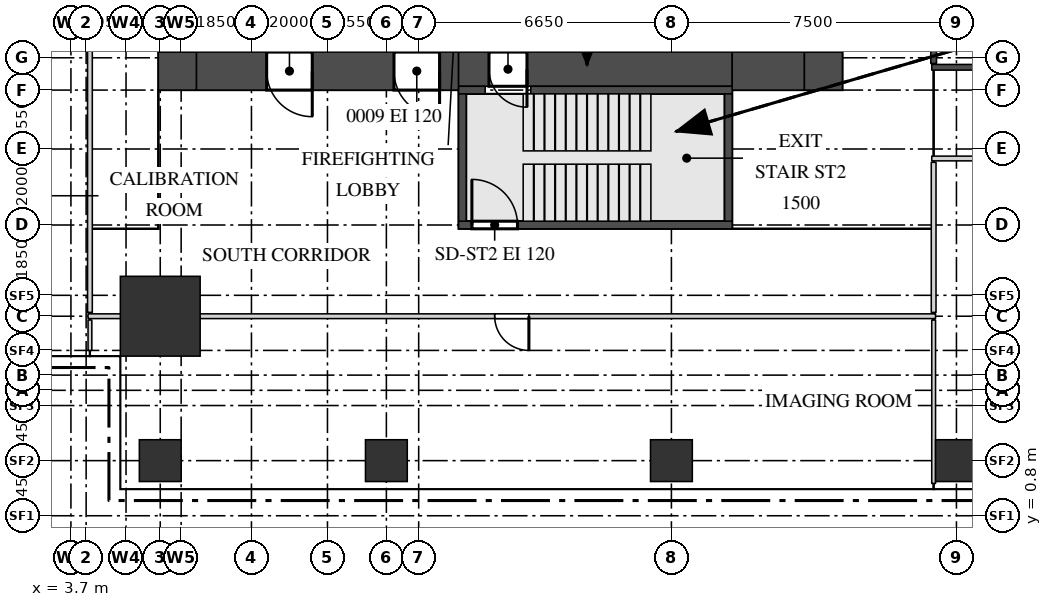
"""IFC4 building model, lengths in metres.
Left out: names, types, materials, properties, quantities, classifications, styles, units other than length and angle.
Written with IfcOpenShell. Run it as: python <this file> out.ifc"""

import sys

from ifc_helpers import new_model, si_unit, direction, frame, frame_2d, origin, origin_2d, place, context, subcontext, project, spatial, rectangle, extrude, source, transform, mapped, element, fill, save


model = new_model("IFC4")
c1 = context("Model", 3, precision=1e-05, world=origin(), true_north=direction((0.0, 1.0)))
c2 = subcontext(c1, "Body", "Model", "MODEL_VIEW")
j1 = project(units=[si_unit("LENGTHUNIT", "METRE"), si_unit("PLANEANGLEUNIT", "RADIAN")], contexts=[c1])
p1 = place(None, origin())
s1 = spatial("IfcSite", under=j1, at=p1, CompositionType="ELEMENT")
p2 = place(p1, origin())
s2 = spatial("IfcBuilding", under=s1, at=p2, CompositionType="ELEMENT")
p3 = place(p2, frame((0.0, 0.0, 127.9)))
s3 = spatial("IfcBuildingStorey", under=s2, at=p3, CompositionType="ELEMENT", Elevation=127.9)
m1 = source(origin(), c2, "Body", "SweptSolid", [
    extrude(rectangle(XDim=6.9, YDim=1.0, at=frame_2d((3.45, 0.0))), origin(), (0.0, 0.0, 1.0), 4.1),
])
p4 = place(p3, frame((7.0, 12.5, 0.0), z_axis=(0.0, 0.0, 1.0), x_axis=(1.0, 0.0, 0.0)))
e1 = element("IfcWall", 1, at=p4, inside=s3, PredefinedType="SHEAR", context=c2, shape_type="MappedRepresentation", body=[
    mapped(m1, transform((0.0, 0.0, 0.0))),
])
m2 = source(origin(), c2, "Body", "SweptSolid", [
    extrude(rectangle(XDim=1.2, YDim=2.1, at=frame_2d((0.6, 1.05))), frame((0.0, 0.51, 0.0), z_axis=(0.0, -1.0, 0.0), x_axis=(1.0, 0.0, 0.0)), (0.0, 0.0, 1.0), 1.02),
])
p5 = place(p4, frame((5.2, 0.0, 0.0)))
e2 = element("IfcOpeningElement", 2, at=p5, cuts=e1, PredefinedType="OPENING", context=c2, shape_type="MappedRepresentation", body=[
    mapped(m2, transform((0.0, 0.0, 0.0))),
])
p6 = place(p4, frame((1.85, 0.0, 0.0)))
e3 = element("IfcOpeningElement", 3, at=p6, cuts=e1, PredefinedType="OPENING", context=c2, shape_type="MappedRepresentation", body=[
    mapped(m2, transform((0.0, 0.0, 0.0))),
])
m3 = source(origin(), c2, "Body", "SweptSolid", [
    extrude(rectangle(XDim=7.2, YDim=0.9, at=frame_2d((3.6, 0.0))), origin(), (0.0, 0.0, 1.0), 4.1),
])
p7 = place(p3, frame((13.9, 12.55, 0.0), z_axis=(0.0, 0.0, 1.0), x_axis=(1.0, 0.0, 0.0)))
e4 = element("IfcWall", 4, at=p7, inside=s3, PredefinedType="SHEAR", context=c2, shape_type="MappedRepresentation", body=[
    mapped(m3, transform((0.0, 0.0, 0.0))),
])
m4 = source(origin(), c2, "Body", "SweptSolid", [
    extrude(rectangle(XDim=1.0, YDim=2.1, at=frame_2d((0.5, 1.05))), frame((0.0, 0.46, 0.0), z_axis=(0.0, -1.0, 0.0), x_axis=(1.0, 0.0, 0.0)), (0.0, 0.0, 1.0), 0.92),
])
p8 = place(p7, frame((0.8, 0.0, 0.0)))
e5 = element("IfcOpeningElement", 5, at=p8, cuts=e4, PredefinedType="OPENING", context=c2, shape_type="MappedRepresentation", body=[
    mapped(m4, transform((0.0, 0.0, 0.0))),
])
m5 = source(origin(), c2, "Body", "SweptSolid", [
    extrude(rectangle(XDim=1.9, YDim=1.0, at=frame_2d((0.95, 0.0))), origin(), (0.0, 0.0, 1.0), 4.1),
])
p9 = place(p3, frame((21.1, 12.5, 0.0), z_axis=(0.0, 0.0, 1.0), x_axis=(1.0, 0.0, 0.0)))
e6 = element("IfcWall", 6, at=p9, inside=s3, PredefinedType="SHEAR", context=c2, shape_type="MappedRepresentation", body=[
    mapped(m5, transform((0.0, 0.0, 0.0))),
])
m6 = source(origin(), c2, "Body", "SweptSolid", [
    extrude(rectangle(XDim=1.0, YDim=1.0, at=frame_2d((0.5, 0.0))), origin(), (0.0, 0.0, 1.0), 4.1),
])
for number, where, z_axis, x_axis in (
    (7, (23.0, 12.5, 0.0), (0.0, 0.0, 1.0), (1.0, 0.0, 0.0)),
    (8, (6.0, 12.5, 0.0), (0.0, 0.0, 1.0), (1.0, 0.0, 0.0)),
):
    element("IfcWall", number, at=place(p3, frame(where, z_axis=z_axis, x_axis=x_axis)), inside=s3, PredefinedType="SHEAR", context=c2, shape_type="MappedRepresentation", body=[
        mapped(m6, transform((0.0, 0.0, 0.0))),
    ])
m7 = source(origin(), c2, "Body", "SweptSolid", [
    extrude(rectangle(XDim=0.7, YDim=0.2, at=frame_2d((0.35, 0.0))), origin(), (0.0, 0.0, 1.0), 4.1),
])
p10 = place(p3, frame((13.9, 12.0, 0.0), z_axis=(0.0, 0.0, 1.0), x_axis=(1.0, 0.0, 0.0)))
e9 = element("IfcWall", 9, at=p10, inside=s3, PredefinedType="SHEAR", context=c2, shape_type="MappedRepresentation", body=[
    mapped(m7, transform((0.0, 0.0, 0.0))),
])
m8 = source(origin(), c2, "Body", "SweptSolid", [
    extrude(rectangle(XDim=5.3, YDim=0.2, at=frame_2d((2.65, 0.0))), origin(), (0.0, 0.0, 1.0), 4.1),
])
p11 = place(p3, frame((15.8, 12.0, 0.0), z_axis=(0.0, 0.0, 1.0), x_axis=(1.0, 0.0, 0.0)))
e10 = element("IfcWall", 10, at=p11, inside=s3, PredefinedType="SHEAR", context=c2, shape_type="MappedRepresentation", body=[
    mapped(m8, transform((0.0, 0.0, 0.0))),
])
m9 = source(origin(), c2, "Body", "SweptSolid", [
    extrude(rectangle(XDim=7.2, YDim=0.2, at=frame_2d((3.6, 0.0))), origin(), (0.0, 0.0, 1.0), 4.1),
])
p12 = place(p3, frame((13.9, 8.45, 0.0), z_axis=(0.0, 0.0, 1.0), x_axis=(1.0, 0.0, 0.0)))
e11 = element("IfcWall", 11, at=p12, inside=s3, PredefinedType="SHEAR", context=c2, shape_type="MappedRepresentation", body=[
    mapped(m9, transform((0.0, 0.0, 0.0))),
])
m10 = source(origin(), c2, "Body", "SweptSolid", [
    extrude(rectangle(XDim=1.2, YDim=2.1, at=frame_2d((0.6, 1.05))), frame((0.0, 0.11, 0.0), z_axis=(0.0, -1.0, 0.0), x_axis=(1.0, 0.0, 0.0)), (0.0, 0.0, 1.0), 0.22),
])
p13 = place(p12, frame((0.35, 0.0, 0.0)))
e12 = element("IfcOpeningElement", 12, at=p13, cuts=e11, PredefinedType="OPENING", context=c2, shape_type="MappedRepresentation", body=[
    mapped(m10, transform((0.0, 0.0, 0.0))),
])
m11 = source(origin(), c2, "Body", "SweptSolid", [
    extrude(rectangle(XDim=3.35, YDim=0.2, at=frame_2d((1.675, 0.0))), origin(), (0.0, 0.0, 1.0), 4.1),
])
for number, where, z_axis, x_axis in (
    (13, (21.0, 8.55, 0.0), (0.0, 0.0, 1.0), (0.0, 1.0, 0.0)),
    (14, (14.0, 8.55, 0.0), (0.0, 0.0, 1.0), (0.0, 1.0, 0.0)),
):
    element("IfcWall", number, at=place(p3, frame(where, z_axis=z_axis, x_axis=x_axis)), inside=s3, PredefinedType="SHEAR", context=c2, shape_type="MappedRepresentation", body=[
        mapped(m11, transform((0.0, 0.0, 0.0))),
    ])
m12 = source(origin(), c2, "Body", "SweptSolid", [
    extrude(rectangle(XDim=2.1, YDim=2.1, at=origin_2d()), origin(), (0.0, 0.0, 1.0), 4.4),
])
p14 = place(p3, frame((6.05, 6.05, 0.0), z_axis=(0.0, 0.0, 1.0), x_axis=(1.0, 0.0, 0.0)))
e15 = element("IfcColumn", 15, at=p14, inside=s3, PredefinedType="COLUMN", context=c2, shape_type="MappedRepresentation", body=[
    mapped(m12, transform((0.0, 0.0, 0.0))),
])
m13 = source(origin(), c2, "Body", "SweptSolid", [
    extrude(rectangle(XDim=1.1, YDim=1.1, at=origin_2d()), origin(), (0.0, 0.0, 1.0), 4.1),
])
for number, where, z_axis, x_axis in (
    (16, (6.05, 2.25, 0.0), (0.0, 0.0, 1.0), (1.0, 0.0, 0.0)),
    (17, (12.0, 2.25, 0.0), (0.0, 0.0, 1.0), (1.0, 0.0, 0.0)),
    (18, (19.5, 2.25, 0.0), (0.0, 0.0, 1.0), (1.0, 0.0, 0.0)),
    (19, (27.0, 2.25, 0.0), (0.0, 0.0, 1.0), (1.0, 0.0, 0.0)),
):
    element("IfcColumn", number, at=place(p3, frame(where, z_axis=z_axis, x_axis=x_axis)), inside=s3, PredefinedType="COLUMN", context=c2, shape_type="MappedRepresentation", body=[
        mapped(m13, transform((0.0, 0.0, 0.0))),
    ])
m14 = source(origin(), c2, "Body", "SweptSolid", [
    extrude(rectangle(XDim=4.3, YDim=0.1, at=frame_2d((2.15, 0.0))), origin(), (0.0, 0.0, 1.0), 4.2),
])
p15 = place(p3, frame((26.4, 1.65, 0.0), z_axis=(0.0, 0.0, 1.0), x_axis=(0.0, 1.0, 0.0)))
e20 = element("IfcWall", 20, at=p15, inside=s3, PredefinedType="PARTITIONING", context=c2, shape_type="MappedRepresentation", body=[
    mapped(m14, transform((0.0, 0.0, 0.0))),
])
m15 = source(origin(), c2, "Body", "SweptSolid", [
    extrude(rectangle(XDim=0.8, YDim=0.1, at=frame_2d((0.4, 0.0))), origin(), (0.0, 0.0, 1.0), 4.2),
])
p16 = place(p3, frame((4.2, 5.15, 0.0), z_axis=(0.0, 0.0, 1.0), x_axis=(0.0, 1.0, 0.0)))
e21 = element("IfcWall", 21, at=p16, inside=s3, PredefinedType="PARTITIONING", context=c2, shape_type="MappedRepresentation", body=[
    mapped(m15, transform((0.0, 0.0, 0.0))),
])
m16 = source(origin(), c2, "Body", "SweptSolid", [
    extrude(rectangle(XDim=22.3, YDim=0.125, at=frame_2d((11.15, 0.0))), origin(), (0.0, 0.0, 1.0), 3.55),
])
p17 = place(p3, frame((4.15, 6.05, 0.0), z_axis=(0.0, 0.0, 1.0), x_axis=(1.0, 0.0, 0.0)))
e22 = element("IfcWall", 22, at=p17, inside=s3, PredefinedType="PARTITIONING", context=c2, shape_type="MappedRepresentation", body=[
    mapped(m16, transform((0.0, 0.0, 0.0))),
])
m17 = source(origin(), c2, "Body", "SweptSolid", [
    extrude(rectangle(XDim=0.9, YDim=2.1, at=frame_2d((0.45, 1.05))), frame((0.0, 0.073, 0.0), z_axis=(0.0, -1.0, 0.0), x_axis=(1.0, 0.0, 0.0)), (0.0, 0.0, 1.0), 0.145),
])
p18 = place(p17, frame((10.7, 0.0, 0.0)))
e23 = element("IfcOpeningElement", 23, at=p18, cuts=e22, PredefinedType="OPENING", context=c2, shape_type="MappedRepresentation", body=[
    mapped(m17, transform((0.0, 0.0, 0.0))),
])
m18 = source(origin(), c2, "Body", "SweptSolid", [
    extrude(rectangle(XDim=21.15, YDim=0.125, at=frame_2d((10.575, 0.0))), origin(), (0.0, 0.0, 1.0), 4.2),
])
p19 = place(p3, frame((4.2, 6.15, 0.0), z_axis=(0.0, 0.0, 1.0), x_axis=(0.0, 1.0, 0.0)))
e24 = element("IfcWall", 24, at=p19, inside=s3, PredefinedType="PARTITIONING", context=c2, shape_type="MappedRepresentation", body=[
    mapped(m18, transform((0.0, 0.0, 0.0))),
])
p20 = place(p19, frame((7.2, 0.0, 0.0)))
e25 = element("IfcOpeningElement", 25, at=p20, cuts=e24, PredefinedType="OPENING", context=c2, shape_type="MappedRepresentation", body=[
    mapped(m17, transform((0.0, 0.0, 0.0))),
])
p21 = place(p19, frame((16.8, 0.0, 0.0)))
e26 = element("IfcOpeningElement", 26, at=p21, cuts=e24, PredefinedType="OPENING", context=c2, shape_type="MappedRepresentation", body=[
    mapped(m17, transform((0.0, 0.0, 0.0))),
])
m19 = source(origin(), c2, "Body", "SweptSolid", [
    extrude(rectangle(XDim=3.95, YDim=0.125, at=frame_2d((1.975, 0.0))), origin(), (0.0, 0.0, 1.0), 4.2),
])
p22 = place(p3, frame((26.4, 6.15, 0.0), z_axis=(0.0, 0.0, 1.0), x_axis=(0.0, 1.0, 0.0)))
e27 = element("IfcWall", 27, at=p22, inside=s3, PredefinedType="PARTITIONING", context=c2, shape_type="MappedRepresentation", body=[
    mapped(m19, transform((0.0, 0.0, 0.0))),
])
m20 = source(origin(), c2, "Body", "SweptSolid", [
    extrude(rectangle(XDim=20.0, YDim=0.125, at=frame_2d((10.0, 0.0))), origin(), (0.0, 0.0, 1.0), 4.2),
])
p23 = place(p3, frame((26.35, 10.2, 0.0), z_axis=(0.0, 0.0, 1.0), x_axis=(1.0, 0.0, 0.0)))
e28 = element("IfcWall", 28, at=p23, inside=s3, PredefinedType="PARTITIONING", context=c2, shape_type="MappedRepresentation", body=[
    mapped(m20, transform((0.0, 0.0, 0.0))),
])
m21 = source(origin(), c2, "Body", "SweptSolid", [
    extrude(rectangle(XDim=1.2, YDim=2.1, at=frame_2d((0.6, 1.05))), frame((0.0, 0.073, 0.0), z_axis=(0.0, -1.0, 0.0), x_axis=(1.0, 0.0, 0.0)), (0.0, 0.0, 1.0), 0.145),
])
p24 = place(p23, frame((3.5, 0.0, 0.0)))
e29 = element("IfcOpeningElement", 29, at=p24, cuts=e28, PredefinedType="OPENING", context=c2, shape_type="MappedRepresentation", body=[
    mapped(m21, transform((0.0, 0.0, 0.0))),
])
p25 = place(p23, frame((12.3, 0.0, 0.0)))
e30 = element("IfcOpeningElement", 30, at=p25, cuts=e28, PredefinedType="OPENING", context=c2, shape_type="MappedRepresentation", body=[
    mapped(m21, transform((0.0, 0.0, 0.0))),
])
m22 = source(origin(), c2, "Body", "SweptSolid", [
    extrude(rectangle(XDim=17.7, YDim=0.15, at=frame_2d((8.85, 0.0))), origin(), (0.0, 0.0, 1.0), 4.2),
])
p26 = place(p3, frame((26.35, 12.6, 0.0), z_axis=(0.0, 0.0, 1.0), x_axis=(1.0, 0.0, 0.0)))
e31 = element("IfcWall", 31, at=p26, inside=s3, PredefinedType="PARTITIONING", context=c2, shape_type="MappedRepresentation", body=[
    mapped(m22, transform((0.0, 0.0, 0.0))),
])
m23 = source(origin(), c2, "Body", "SweptSolid", [
    extrude(rectangle(XDim=5.2, YDim=0.15, at=frame_2d((2.6, 0.0))), origin(), (0.0, 0.0, 1.0), 4.2),
])
p27 = place(p3, frame((26.4, 12.7, 0.0), z_axis=(0.0, 0.0, 1.0), x_axis=(0.0, 1.0, 0.0)))
e32 = element("IfcWall", 32, at=p27, inside=s3, PredefinedType="PARTITIONING", context=c2, shape_type="MappedRepresentation", body=[
    mapped(m23, transform((0.0, 0.0, 0.0))),
])
m24 = source(origin(), c2, "Body", "SweptSolid", [
    extrude(rectangle(XDim=0.9, YDim=2.1, at=frame_2d((0.45, 1.05))), frame((0.0, 0.085, 0.0), z_axis=(0.0, -1.0, 0.0), x_axis=(1.0, 0.0, 0.0)), (0.0, 0.0, 1.0), 0.17),
])
p28 = place(p27, frame((2.15, 0.0, 0.0)))
e33 = element("IfcOpeningElement", 33, at=p28, cuts=e32, PredefinedType="OPENING", context=c2, shape_type="MappedRepresentation", body=[
    mapped(m24, transform((0.0, 0.0, 0.0))),
])
m25 = source(origin(), c2, "Body", "SweptSolid", [
    extrude(rectangle(XDim=1.2, YDim=2.1, at=frame_2d((0.6, 1.05))), frame((0.0, 0.45, 0.0), z_axis=(0.0, -1.0, 0.0), x_axis=(1.0, 0.0, 0.0)), (0.0, 0.0, 1.0), 0.9),
])
p29 = place(p5, origin())
e34 = element("IfcDoor", 34, at=p29, inside=s3, OperationType="SINGLE_SWING_RIGHT", PredefinedType="DOOR", context=c2, shape_type="MappedRepresentation", body=[
    mapped(m25, transform((0.0, 0.0, 0.0))),
])
fill(e2, e34)
p30 = place(p6, origin())
e35 = element("IfcDoor", 35, at=p30, inside=s3, OperationType="SINGLE_SWING_RIGHT", PredefinedType="DOOR", context=c2, shape_type="MappedRepresentation", body=[
    mapped(m25, transform((0.0, 0.0, 0.0))),
])
fill(e3, e35)
m26 = source(origin(), c2, "Body", "SweptSolid", [
    extrude(rectangle(XDim=1.0, YDim=2.1, at=frame_2d((0.5, 1.05))), frame((0.0, 0.4, 0.0), z_axis=(0.0, -1.0, 0.0), x_axis=(1.0, 0.0, 0.0)), (0.0, 0.0, 1.0), 0.8),
])
p31 = place(p8, origin())
e36 = element("IfcDoor", 36, at=p31, inside=s3, OperationType="SINGLE_SWING_RIGHT", PredefinedType="DOOR", context=c2, shape_type="MappedRepresentation", body=[
    mapped(m26, transform((0.0, 0.0, 0.0))),
])
fill(e5, e36)
m27 = source(origin(), c2, "Body", "SweptSolid", [
    extrude(rectangle(XDim=0.9, YDim=2.1, at=frame_2d((0.45, 1.05))), frame((0.0, 0.025, 0.0), z_axis=(0.0, -1.0, 0.0), x_axis=(1.0, 0.0, 0.0)), (0.0, 0.0, 1.0), 0.05),
])
p32 = place(p18, origin())
e37 = element("IfcDoor", 37, at=p32, inside=s3, OperationType="SINGLE_SWING_RIGHT", PredefinedType="DOOR", context=c2, shape_type="MappedRepresentation", body=[
    mapped(m27, transform((0.0, 0.0, 0.0))),
])
fill(e23, e37)
m28 = source(origin(), c2, "Body", "SweptSolid", [
    extrude(rectangle(XDim=1.2, YDim=2.1, at=frame_2d((0.6, 1.05))), frame((0.0, 0.025, 0.0), z_axis=(0.0, -1.0, 0.0), x_axis=(1.0, 0.0, 0.0)), (0.0, 0.0, 1.0), 0.05),
])
p33 = place(p13, origin())
e38 = element("IfcDoor", 38, at=p33, inside=s3, OperationType="SINGLE_SWING_RIGHT", PredefinedType="DOOR", context=c2, shape_type="MappedRepresentation", body=[
    mapped(m28, transform((0.0, 0.0, 0.0))),
])
fill(e12, e38)
save(model, sys.argv[1])
